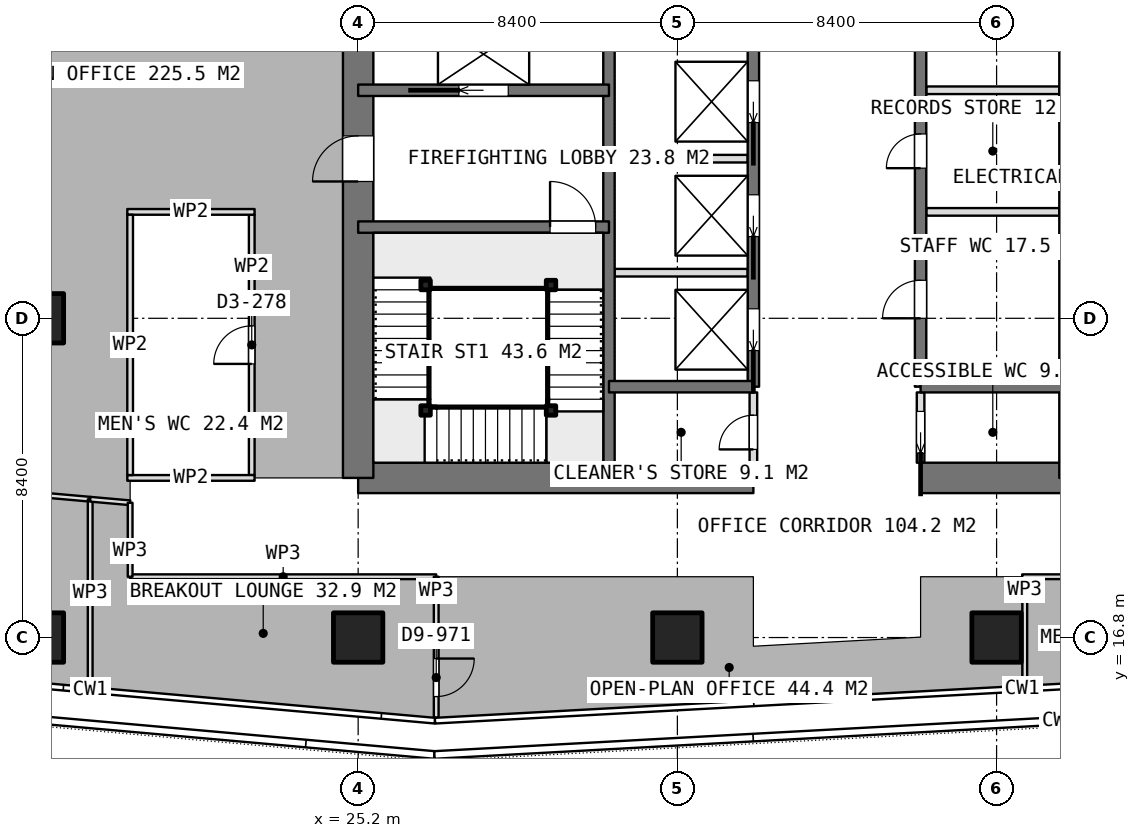
"""IFC4 building model, lengths in metres.
Left out: names, types, materials, properties, quantities, classifications, styles, units other than length and angle.
Written with IfcOpenShell. Run it as: python <this file> out.ifc"""

import sys

from ifc_helpers import new_model, si_unit, direction, frame, frame_2d, origin, origin_2d, place, context, subcontext, project, spatial, rectangle, extrude, element, fill, save


model = new_model("IFC4")
c1 = context("Model", 3, precision=1e-05, world=origin(), true_north=direction((0.0, 1.0)))
c2 = subcontext(c1, "Body", "Model", "MODEL_VIEW")
j1 = project(units=[si_unit("LENGTHUNIT", "METRE"), si_unit("PLANEANGLEUNIT", "RADIAN")], contexts=[c1])
p1 = place(None, origin())
s1 = spatial("IfcSite", under=j1, at=p1, CompositionType="ELEMENT")
p2 = place(p1, origin())
s2 = spatial("IfcBuilding", under=s1, at=p2, CompositionType="ELEMENT")
p3 = place(p2, frame((0.0, 0.0, 261.35)))
s3 = spatial("IfcBuildingStorey", under=s2, at=p3, CompositionType="ELEMENT", Elevation=261.35)
p4 = place(p3, frame((25.2, 21.0, 0.0), z_axis=(0.0, 0.0, 1.0), x_axis=(1.0, 0.0, 0.0)))
e1 = element("IfcWall", 1, at=p4, inside=s3, PredefinedType="SHEAR", context=c2, shape_type="SweptSolid", body=[
    extrude(rectangle(XDim=10.4, YDim=0.8, at=frame_2d((5.2, 0.0))), origin(), (0.0, 0.0, 1.0), 3.75),
])
p5 = place(p3, frame((40.0, 21.0, 0.0), z_axis=(0.0, 0.0, 1.0), x_axis=(1.0, 0.0, 0.0)))
e2 = element("IfcWall", 2, at=p5, inside=s3, PredefinedType="SHEAR", context=c2, shape_type="SweptSolid", body=[
    extrude(rectangle(XDim=10.4, YDim=0.8, at=frame_2d((5.2, 0.0))), origin(), (0.0, 0.0, 1.0), 3.75),
])
p6 = place(p3, frame((25.2, 21.0, 0.0), z_axis=(0.0, 0.0, 1.0), x_axis=(0.0, 1.0, 0.0)))
e3 = element("IfcWall", 3, at=p6, inside=s3, PredefinedType="SHEAR", context=c2, shape_type="SweptSolid", body=[
    extrude(rectangle(XDim=25.2, YDim=0.8, at=frame_2d((12.6, 0.0))), origin(), (0.0, 0.0, 1.0), 3.75),
])
p7 = place(p6, frame((7.8, 0.0, 0.0)))
e4 = element("IfcOpeningElement", 4, at=p7, cuts=e3, PredefinedType="OPENING", context=c2, shape_type="SweptSolid", body=[
    extrude(rectangle(XDim=1.2, YDim=2.1, at=frame_2d((0.6, 1.05))), frame((0.0, 0.41, 0.0), z_axis=(0.0, -1.0, 0.0), x_axis=(1.0, 0.0, 0.0)), (0.0, 0.0, 1.0), 0.82),
])
p8 = place(p6, frame((14.25, 0.0, 0.0)))
e5 = element("IfcOpeningElement", 5, at=p8, cuts=e3, PredefinedType="OPENING", context=c2, shape_type="SweptSolid", body=[
    extrude(rectangle(XDim=0.9, YDim=2.1, at=frame_2d((0.45, 1.05))), frame((0.0, 0.41, 0.0), z_axis=(0.0, -1.0, 0.0), x_axis=(1.0, 0.0, 0.0)), (0.0, 0.0, 1.0), 0.82),
])
p9 = place(p6, frame((16.85, 0.0, 0.0)))
e6 = element("IfcOpeningElement", 6, at=p9, cuts=e3, PredefinedType="OPENING", context=c2, shape_type="SweptSolid", body=[
    extrude(rectangle(XDim=0.9, YDim=2.1, at=frame_2d((0.45, 1.05))), frame((0.0, 0.41, 0.0), z_axis=(0.0, -1.0, 0.0), x_axis=(1.0, 0.0, 0.0)), (0.0, 0.0, 1.0), 0.82),
])
p10 = place(p6, frame((18.95, 0.0, 0.0)))
e7 = element("IfcOpeningElement", 7, at=p10, cuts=e3, PredefinedType="OPENING", context=c2, shape_type="SweptSolid", body=[
    extrude(rectangle(XDim=1.2, YDim=2.1, at=frame_2d((0.6, 1.05))), frame((0.0, 0.41, 0.0), z_axis=(0.0, -1.0, 0.0), x_axis=(1.0, 0.0, 0.0)), (0.0, 0.0, 1.0), 0.82),
])
for number, where, z_axis, x_axis in (
    (8, (31.8, 21.0, 0.0), (0.0, 0.0, 1.0), (0.0, 1.0, 0.0)),
    (9, (43.8, 21.0, 0.0), (0.0, 0.0, 1.0), (0.0, 1.0, 0.0)),
):
    element("IfcWall", number, at=place(p3, frame(where, z_axis=z_axis, x_axis=x_axis)), inside=s3, PredefinedType="SHEAR", context=c2, shape_type="SweptSolid", body=[
        extrude(rectangle(XDim=25.2, YDim=0.3, at=frame_2d((12.6, 0.0))), origin(), (0.0, 0.0, 1.0), 3.75),
    ])
p11 = place(p3, frame((35.6, 23.4, 0.0), z_axis=(0.0, 0.0, 1.0), x_axis=(0.0, 1.0, 0.0)))
e10 = element("IfcWall", 10, at=p11, inside=s3, PredefinedType="SHEAR", context=c2, shape_type="SweptSolid", body=[
    extrude(rectangle(XDim=18.0, YDim=0.3, at=frame_2d((9.0, 0.0))), origin(), (0.0, 0.0, 1.0), 3.75),
])
p12 = place(p11, frame((0.95, 0.0, 0.0)))
e11 = element("IfcOpeningElement", 11, at=p12, cuts=e10, PredefinedType="OPENING", context=c2, shape_type="SweptSolid", body=[
    extrude(rectangle(XDim=1.1, YDim=2.1, at=frame_2d((0.55, 1.05))), frame((0.0, 0.16, 0.0), z_axis=(0.0, -1.0, 0.0), x_axis=(1.0, 0.0, 0.0)), (0.0, 0.0, 1.0), 0.32),
])
p13 = place(p11, frame((3.95, 0.0, 0.0)))
e12 = element("IfcOpeningElement", 12, at=p13, cuts=e10, PredefinedType="OPENING", context=c2, shape_type="SweptSolid", body=[
    extrude(rectangle(XDim=1.1, YDim=2.1, at=frame_2d((0.55, 1.05))), frame((0.0, 0.16, 0.0), z_axis=(0.0, -1.0, 0.0), x_axis=(1.0, 0.0, 0.0)), (0.0, 0.0, 1.0), 0.32),
])
p14 = place(p11, frame((6.95, 0.0, 0.0)))
e13 = element("IfcOpeningElement", 13, at=p14, cuts=e10, PredefinedType="OPENING", context=c2, shape_type="SweptSolid", body=[
    extrude(rectangle(XDim=1.1, YDim=2.1, at=frame_2d((0.55, 1.05))), frame((0.0, 0.16, 0.0), z_axis=(0.0, -1.0, 0.0), x_axis=(1.0, 0.0, 0.0)), (0.0, 0.0, 1.0), 0.32),
])
p15 = place(p11, frame((9.95, 0.0, 0.0)))
e14 = element("IfcOpeningElement", 14, at=p15, cuts=e10, PredefinedType="OPENING", context=c2, shape_type="SweptSolid", body=[
    extrude(rectangle(XDim=1.1, YDim=2.1, at=frame_2d((0.55, 1.05))), frame((0.0, 0.16, 0.0), z_axis=(0.0, -1.0, 0.0), x_axis=(1.0, 0.0, 0.0)), (0.0, 0.0, 1.0), 0.32),
])
p16 = place(p11, frame((12.95, 0.0, 0.0)))
e15 = element("IfcOpeningElement", 15, at=p16, cuts=e10, PredefinedType="OPENING", context=c2, shape_type="SweptSolid", body=[
    extrude(rectangle(XDim=1.1, YDim=2.1, at=frame_2d((0.55, 1.05))), frame((0.0, 0.16, 0.0), z_axis=(0.0, -1.0, 0.0), x_axis=(1.0, 0.0, 0.0)), (0.0, 0.0, 1.0), 0.32),
])
p17 = place(p11, frame((15.95, 0.0, 0.0)))
e16 = element("IfcOpeningElement", 16, at=p17, cuts=e10, PredefinedType="OPENING", context=c2, shape_type="SweptSolid", body=[
    extrude(rectangle(XDim=1.1, YDim=2.1, at=frame_2d((0.55, 1.05))), frame((0.0, 0.16, 0.0), z_axis=(0.0, -1.0, 0.0), x_axis=(1.0, 0.0, 0.0)), (0.0, 0.0, 1.0), 0.32),
])
p18 = place(p3, frame((40.0, 23.4, 0.0), z_axis=(0.0, 0.0, 1.0), x_axis=(0.0, 1.0, 0.0)))
e17 = element("IfcWall", 17, at=p18, inside=s3, PredefinedType="SHEAR", context=c2, shape_type="SweptSolid", body=[
    extrude(rectangle(XDim=18.0, YDim=0.3, at=frame_2d((9.0, 0.0))), origin(), (0.0, 0.0, 1.0), 3.75),
])
p19 = place(p18, frame((1.8, 0.0, 0.0)))
e18 = element("IfcOpeningElement", 18, at=p19, cuts=e17, PredefinedType="OPENING", context=c2, shape_type="SweptSolid", body=[
    extrude(rectangle(XDim=1.0, YDim=2.1, at=frame_2d((0.5, 1.05))), frame((0.0, 0.16, 0.0), z_axis=(0.0, -1.0, 0.0), x_axis=(1.0, 0.0, 0.0)), (0.0, 0.0, 1.0), 0.32),
])
p20 = place(p18, frame((5.75, 0.0, 0.0)))
e19 = element("IfcOpeningElement", 19, at=p20, cuts=e17, PredefinedType="OPENING", context=c2, shape_type="SweptSolid", body=[
    extrude(rectangle(XDim=0.9, YDim=2.1, at=frame_2d((0.45, 1.05))), frame((0.0, 0.16, 0.0), z_axis=(0.0, -1.0, 0.0), x_axis=(1.0, 0.0, 0.0)), (0.0, 0.0, 1.0), 0.32),
])
p21 = place(p18, frame((9.4, 0.0, 0.0)))
e20 = element("IfcOpeningElement", 20, at=p21, cuts=e17, PredefinedType="OPENING", context=c2, shape_type="SweptSolid", body=[
    extrude(rectangle(XDim=1.0, YDim=2.1, at=frame_2d((0.5, 1.05))), frame((0.0, 0.16, 0.0), z_axis=(0.0, -1.0, 0.0), x_axis=(1.0, 0.0, 0.0)), (0.0, 0.0, 1.0), 0.32),
])
for number, where, z_axis, x_axis in (
    (21, (31.8, 23.4, 0.0), (0.0, 0.0, 1.0), (1.0, 0.0, 0.0)),
    (22, (40.0, 23.4, 0.0), (0.0, 0.0, 1.0), (1.0, 0.0, 0.0)),
):
    element("IfcWall", number, at=place(p3, frame(where, z_axis=z_axis, x_axis=x_axis)), inside=s3, PredefinedType="SHEAR", context=c2, shape_type="SweptSolid", body=[
        extrude(rectangle(XDim=3.8, YDim=0.3, at=frame_2d((1.9, 0.0))), origin(), (0.0, 0.0, 1.0), 3.75),
    ])
p22 = place(p3, frame((25.2, 27.6, 0.0), z_axis=(0.0, 0.0, 1.0), x_axis=(1.0, 0.0, 0.0)))
e23 = element("IfcWall", 23, at=p22, inside=s3, PredefinedType="SHEAR", context=c2, shape_type="SweptSolid", body=[
    extrude(rectangle(XDim=6.6, YDim=0.3, at=frame_2d((3.3, 0.0))), origin(), (0.0, 0.0, 1.0), 3.75),
])
p23 = place(p22, frame((5.05, 0.0, 0.0)))
e24 = element("IfcOpeningElement", 24, at=p23, cuts=e23, PredefinedType="OPENING", context=c2, shape_type="SweptSolid", body=[
    extrude(rectangle(XDim=1.2, YDim=2.1, at=frame_2d((0.6, 1.05))), frame((0.0, 0.16, 0.0), z_axis=(0.0, -1.0, 0.0), x_axis=(1.0, 0.0, 0.0)), (0.0, 0.0, 1.0), 0.32),
])
p24 = place(p3, frame((25.2, 31.2, 0.0), z_axis=(0.0, 0.0, 1.0), x_axis=(1.0, 0.0, 0.0)))
e25 = element("IfcWall", 25, at=p24, inside=s3, PredefinedType="SHEAR", context=c2, shape_type="SweptSolid", body=[
    extrude(rectangle(XDim=6.6, YDim=0.3, at=frame_2d((3.3, 0.0))), origin(), (0.0, 0.0, 1.0), 3.75),
])
p25 = place(p24, frame((2.65, 0.0, 0.0)))
e26 = element("IfcOpeningElement", 26, at=p25, cuts=e25, PredefinedType="OPENING", context=c2, shape_type="SweptSolid", body=[
    extrude(rectangle(XDim=1.3, YDim=2.1, at=frame_2d((0.65, 1.05))), frame((0.0, 0.16, 0.0), z_axis=(0.0, -1.0, 0.0), x_axis=(1.0, 0.0, 0.0)), (0.0, 0.0, 1.0), 0.32),
])
for number, where, z_axis, x_axis in (
    (27, (16.8, 16.8, 0.0), (0.0, 0.0, 1.0), (1.0, 0.0, 0.0)),
    (28, (16.8, 25.2, 0.0), (0.0, 0.0, 1.0), (1.0, 0.0, 0.0)),
    (29, (25.2, 16.8, 0.0), (0.0, 0.0, 1.0), (1.0, 0.0, 0.0)),
    (30, (33.6, 16.8, 0.0), (0.0, 0.0, 1.0), (1.0, 0.0, 0.0)),
    (31, (42.0, 16.8, 0.0), (0.0, 0.0, 1.0), (1.0, 0.0, 0.0)),
):
    element("IfcColumn", number, at=place(p3, frame(where, z_axis=z_axis, x_axis=x_axis)), inside=s3, PredefinedType="COLUMN", context=c2, shape_type="SweptSolid", body=[
        extrude(rectangle(XDim=1.3, YDim=1.3, at=origin_2d()), origin(), (0.0, 0.0, 1.0), 3.75),
    ])
for number, where, z_axis, x_axis in (
    (32, (31.95, 26.4, 0.0), (0.0, 0.0, 1.0), (1.0, 0.0, 0.0)),
    (33, (31.95, 29.4, 0.0), (0.0, 0.0, 1.0), (1.0, 0.0, 0.0)),
):
    element("IfcWall", number, at=place(p3, frame(where, z_axis=z_axis, x_axis=x_axis)), inside=s3, PredefinedType="PARTITIONING", context=c2, shape_type="SweptSolid", body=[
        extrude(rectangle(XDim=3.5, YDim=0.2, at=frame_2d((1.75, 0.0))), origin(), (0.0, 0.0, 1.0), 3.5),
    ])
p26 = place(p3, frame((40.0, 21.4, 0.0), z_axis=(0.0, 0.0, 1.0), x_axis=(0.0, 1.0, 0.0)))
e34 = element("IfcWall", 34, at=p26, inside=s3, PredefinedType="PARTITIONING", context=c2, shape_type="SweptSolid", body=[
    extrude(rectangle(XDim=1.85, YDim=0.2, at=frame_2d((0.925, 0.0))), origin(), (0.0, 0.0, 1.0), 3.5),
])
p27 = place(p26, frame((0.25, 0.0, 0.0)))
e35 = element("IfcOpeningElement", 35, at=p27, cuts=e34, PredefinedType="OPENING", context=c2, shape_type="SweptSolid", body=[
    extrude(rectangle(XDim=1.1, YDim=2.1, at=frame_2d((0.55, 1.05))), frame((0.0, 0.11, 0.0), z_axis=(0.0, -1.0, 0.0), x_axis=(1.0, 0.0, 0.0)), (0.0, 0.0, 1.0), 0.22),
])
p28 = place(p3, frame((35.6, 21.4, 0.0), z_axis=(0.0, 0.0, 1.0), x_axis=(0.0, 1.0, 0.0)))
e36 = element("IfcWall", 36, at=p28, inside=s3, PredefinedType="PARTITIONING", context=c2, shape_type="SweptSolid", body=[
    extrude(rectangle(XDim=1.85, YDim=0.2, at=frame_2d((0.925, 0.0))), origin(), (0.0, 0.0, 1.0), 3.5),
])
p29 = place(p28, frame((0.35, 0.0, 0.0)))
e37 = element("IfcOpeningElement", 37, at=p29, cuts=e36, PredefinedType="OPENING", context=c2, shape_type="SweptSolid", body=[
    extrude(rectangle(XDim=0.9, YDim=2.1, at=frame_2d((0.45, 1.05))), frame((0.0, 0.11, 0.0), z_axis=(0.0, -1.0, 0.0), x_axis=(1.0, 0.0, 0.0)), (0.0, 0.0, 1.0), 0.22),
])
for number, where, z_axis, x_axis in (
    (38, (40.15, 28.0, 0.0), (0.0, 0.0, 1.0), (1.0, 0.0, 0.0)),
    (39, (40.15, 31.2, 0.0), (0.0, 0.0, 1.0), (1.0, 0.0, 0.0)),
):
    element("IfcWall", number, at=place(p3, frame(where, z_axis=z_axis, x_axis=x_axis)), inside=s3, PredefinedType="PARTITIONING", context=c2, shape_type="SweptSolid", body=[
        extrude(rectangle(XDim=3.5, YDim=0.2, at=frame_2d((1.75, 0.0))), origin(), (0.0, 0.0, 1.0), 3.5),
    ])
for number, where, z_axis, x_axis in (
    (40, (19.125, 21.0, 0.0), (0.0, 0.0, 1.0), (1.0, 0.0, 0.0)),
    (41, (19.125, 28.0, 0.0), (0.0, 0.0, 1.0), (1.0, 0.0, 0.0)),
):
    element("IfcWall", number, at=place(p3, frame(where, z_axis=z_axis, x_axis=x_axis)), inside=s3, PredefinedType="PARTITIONING", context=c2, shape_type="SweptSolid", body=[
        extrude(rectangle(XDim=3.35, YDim=0.15, at=frame_2d((1.675, 0.0))), origin(), (0.0, 0.0, 1.0), 3.5),
    ])
p30 = place(p3, frame((19.2, 21.075, 0.0), z_axis=(0.0, 0.0, 1.0), x_axis=(0.0, 1.0, 0.0)))
e42 = element("IfcWall", 42, at=p30, inside=s3, PredefinedType="PARTITIONING", context=c2, shape_type="SweptSolid", body=[
    extrude(rectangle(XDim=6.85, YDim=0.15, at=frame_2d((3.425, 0.0))), origin(), (0.0, 0.0, 1.0), 3.5),
])
p31 = place(p3, frame((22.4, 21.075, 0.0), z_axis=(0.0, 0.0, 1.0), x_axis=(0.0, 1.0, 0.0)))
e43 = element("IfcWall", 43, at=p31, inside=s3, PredefinedType="PARTITIONING", context=c2, shape_type="SweptSolid", body=[
    extrude(rectangle(XDim=6.85, YDim=0.15, at=frame_2d((3.425, 0.0))), origin(), (0.0, 0.0, 1.0), 3.5),
])
p32 = place(p31, frame((2.925, 0.0, 0.0)))
e44 = element("IfcOpeningElement", 44, at=p32, cuts=e43, PredefinedType="OPENING", context=c2, shape_type="SweptSolid", body=[
    extrude(rectangle(XDim=1.0, YDim=2.1, at=frame_2d((0.5, 1.05))), frame((0.0, 0.085, 0.0), z_axis=(0.0, -1.0, 0.0), x_axis=(1.0, 0.0, 0.0)), (0.0, 0.0, 1.0), 0.17),
])
p33 = place(p3, frame((42.742, 15.538, 0.0), z_axis=(0.0, 0.0, 1.0), x_axis=(0.0, 1.0, 0.0)))
e45 = element("IfcWall", 45, at=p33, inside=s3, PredefinedType="PARTITIONING", context=c2, shape_type="SweptSolid", body=[
    extrude(rectangle(XDim=2.799, YDim=0.125, at=frame_2d((1.399, 0.0))), origin(), (0.0, 0.0, 1.0), 3.5),
])
p34 = place(p3, frame((42.674, 18.4, 0.0), z_axis=(0.0, 0.0, 1.0), x_axis=(1.0, 0.0, 0.0)))
e46 = element("IfcWall", 46, at=p34, inside=s3, PredefinedType="PARTITIONING", context=c2, shape_type="SweptSolid", body=[
    extrude(rectangle(XDim=7.726, YDim=0.125, at=frame_2d((3.863, 0.0))), origin(), (0.0, 0.0, 1.0), 3.5),
])
p35 = place(p34, frame((3.363, 0.0, 0.0)))
e47 = element("IfcOpeningElement", 47, at=p35, cuts=e46, PredefinedType="OPENING", context=c2, shape_type="SweptSolid", body=[
    extrude(rectangle(XDim=1.0, YDim=2.1, at=frame_2d((0.5, 1.05))), frame((0.0, 0.073, 0.0), z_axis=(0.0, -1.0, 0.0), x_axis=(1.0, 0.0, 0.0)), (0.0, 0.0, 1.0), 0.145),
])
p36 = place(p3, frame((12.261, 20.962, 0.0), z_axis=(0.0, 0.0, 1.0), x_axis=(0.996078951833, -0.08846876124, 0.0)))
e48 = element("IfcWall", 48, at=p36, inside=s3, PredefinedType="PARTITIONING", context=c2, shape_type="SweptSolid", body=[
    extrude(rectangle(XDim=5.911, YDim=0.125, at=frame_2d((2.956, 0.0))), origin(), (0.0, 0.0, 1.0), 3.5),
])
p37 = place(p3, frame((18.149, 20.439, 0.0), z_axis=(0.0, 0.0, 1.0), x_axis=(0.0, -1.0, 0.0)))
e49 = element("IfcWall", 49, at=p37, inside=s3, PredefinedType="PARTITIONING", context=c2, shape_type="SweptSolid", body=[
    extrude(rectangle(XDim=4.939, YDim=0.125, at=frame_2d((2.469, 0.0))), origin(), (0.0, 0.0, 1.0), 3.5),
])
p38 = place(p3, frame((19.2, 18.4, 0.0), z_axis=(0.0, 0.0, 1.0), x_axis=(1.0, 0.0, 0.0)))
e50 = element("IfcWall", 50, at=p38, inside=s3, PredefinedType="PARTITIONING", context=c2, shape_type="SweptSolid", body=[
    extrude(rectangle(XDim=8.054, YDim=0.125, at=frame_2d((4.027, 0.0))), origin(), (0.0, 0.0, 1.0), 3.5),
])
p39 = place(p3, frame((27.254, 18.4, 0.0), z_axis=(0.0, 0.0, 1.0), x_axis=(0.0, -1.0, 0.0)))
e51 = element("IfcWall", 51, at=p39, inside=s3, PredefinedType="PARTITIONING", context=c2, shape_type="SweptSolid", body=[
    extrude(rectangle(XDim=3.705, YDim=0.125, at=frame_2d((1.853, 0.0))), origin(), (0.0, 0.0, 1.0), 3.5),
])
p40 = place(p39, frame((2.153, 0.0, 0.0)))
e52 = element("IfcOpeningElement", 52, at=p40, cuts=e51, PredefinedType="OPENING", context=c2, shape_type="SweptSolid", body=[
    extrude(rectangle(XDim=1.0, YDim=2.1, at=frame_2d((0.5, 1.05))), frame((0.0, 0.073, 0.0), z_axis=(0.0, -1.0, 0.0), x_axis=(1.0, 0.0, 0.0)), (0.0, 0.0, 1.0), 0.145),
])
p41 = place(p3, frame((18.15, 20.439, 0.0), z_axis=(0.0, 0.0, 1.0), x_axis=(0.996099374617, -0.088238517026, 0.0)))
e53 = element("IfcWall", 53, at=p41, inside=s3, PredefinedType="PARTITIONING", context=c2, shape_type="SweptSolid", body=[
    extrude(rectangle(XDim=1.054, YDim=0.125, at=frame_2d((0.527, 0.0))), origin(), (0.0, 0.0, 1.0), 3.5),
])
p42 = place(p3, frame((19.2, 20.346, 0.0), z_axis=(0.0, 0.0, 1.0), x_axis=(0.0, -1.0, 0.0)))
e54 = element("IfcWall", 54, at=p42, inside=s3, PredefinedType="PARTITIONING", context=c2, shape_type="SweptSolid", body=[
    extrude(rectangle(XDim=1.946, YDim=0.125, at=frame_2d((0.973, 0.0))), origin(), (0.0, 0.0, 1.0), 3.5),
])
for number, where, z_axis, x_axis in (
    (55, (30.275, 26.075, 0.0), (0.0, 0.0, 1.0), (1.0, 0.0, 0.0)),
    (56, (30.275, 22.775, 0.0), (0.0, 0.0, 1.0), (1.0, 0.0, 0.0)),
    (57, (26.975, 22.775, 0.0), (0.0, 0.0, 1.0), (1.0, 0.0, 0.0)),
    (58, (26.975, 26.075, 0.0), (0.0, 0.0, 1.0), (1.0, 0.0, 0.0)),
):
    element("IfcColumn", number, at=place(p3, frame(where, z_axis=z_axis, x_axis=x_axis)), inside=s3, PredefinedType="COLUMN", context=c2, shape_type="SweptSolid", body=[
        extrude(rectangle(XDim=0.25, YDim=0.25, at=origin_2d()), origin(), (0.0, 0.0, 1.0), 3.75),
    ])
p43 = place(p7, origin())
e59 = element("IfcDoor", 59, at=p43, inside=s3, OperationType="SINGLE_SWING_LEFT", PredefinedType="DOOR", context=c2, shape_type="SweptSolid", body=[
    extrude(rectangle(XDim=1.2, YDim=2.1, at=frame_2d((0.6, 1.05))), frame((0.0, 0.025, 0.0), z_axis=(0.0, -1.0, 0.0), x_axis=(1.0, 0.0, 0.0)), (0.0, 0.0, 1.0), 0.05),
])
fill(e4, e59)
p44 = place(p27, origin())
e60 = element("IfcDoor", 60, at=p44, inside=s3, OperationType="SLIDING_TO_LEFT", PredefinedType="DOOR", context=c2, shape_type="SweptSolid", body=[
    extrude(rectangle(XDim=1.1, YDim=2.1, at=frame_2d((0.55, 1.05))), frame((0.0, 0.025, 0.0), z_axis=(0.0, -1.0, 0.0), x_axis=(1.0, 0.0, 0.0)), (0.0, 0.0, 1.0), 0.05),
])
fill(e35, e60)
p45 = place(p29, origin())
e61 = element("IfcDoor", 61, at=p45, inside=s3, OperationType="SINGLE_SWING_LEFT", PredefinedType="DOOR", context=c2, shape_type="SweptSolid", body=[
    extrude(rectangle(XDim=0.9, YDim=2.1, at=frame_2d((0.45, 1.05))), frame((0.0, 0.025, 0.0), z_axis=(0.0, -1.0, 0.0), x_axis=(1.0, 0.0, 0.0)), (0.0, 0.0, 1.0), 0.05),
])
fill(e37, e61)
p46 = place(p19, origin())
e62 = element("IfcDoor", 62, at=p46, inside=s3, OperationType="SINGLE_SWING_LEFT", PredefinedType="DOOR", context=c2, shape_type="SweptSolid", body=[
    extrude(rectangle(XDim=1.0, YDim=2.1, at=frame_2d((0.5, 1.05))), frame((0.0, 0.025, 0.0), z_axis=(0.0, -1.0, 0.0), x_axis=(1.0, 0.0, 0.0)), (0.0, 0.0, 1.0), 0.05),
])
fill(e18, e62)
p47 = place(p20, origin())
e63 = element("IfcDoor", 63, at=p47, inside=s3, OperationType="SINGLE_SWING_LEFT", PredefinedType="DOOR", context=c2, shape_type="SweptSolid", body=[
    extrude(rectangle(XDim=0.9, YDim=2.1, at=frame_2d((0.45, 1.05))), frame((0.0, 0.025, 0.0), z_axis=(0.0, -1.0, 0.0), x_axis=(1.0, 0.0, 0.0)), (0.0, 0.0, 1.0), 0.05),
])
fill(e19, e63)
p48 = place(p12, origin())
e64 = element("IfcDoor", 64, at=p48, inside=s3, OperationType="SLIDING_TO_LEFT", PredefinedType="USERDEFINED", context=c2, shape_type="SweptSolid", body=[
    extrude(rectangle(XDim=1.1, YDim=2.1, at=frame_2d((0.55, 1.05))), frame((0.0, 0.025, 0.0), z_axis=(0.0, -1.0, 0.0), x_axis=(1.0, 0.0, 0.0)), (0.0, 0.0, 1.0), 0.05),
])
fill(e11, e64)
p49 = place(p13, origin())
e65 = element("IfcDoor", 65, at=p49, inside=s3, OperationType="SLIDING_TO_LEFT", PredefinedType="USERDEFINED", context=c2, shape_type="SweptSolid", body=[
    extrude(rectangle(XDim=1.1, YDim=2.1, at=frame_2d((0.55, 1.05))), frame((0.0, 0.025, 0.0), z_axis=(0.0, -1.0, 0.0), x_axis=(1.0, 0.0, 0.0)), (0.0, 0.0, 1.0), 0.05),
])
fill(e12, e65)
p50 = place(p14, origin())
e66 = element("IfcDoor", 66, at=p50, inside=s3, OperationType="SLIDING_TO_LEFT", PredefinedType="USERDEFINED", context=c2, shape_type="SweptSolid", body=[
    extrude(rectangle(XDim=1.1, YDim=2.1, at=frame_2d((0.55, 1.05))), frame((0.0, 0.025, 0.0), z_axis=(0.0, -1.0, 0.0), x_axis=(1.0, 0.0, 0.0)), (0.0, 0.0, 1.0), 0.05),
])
fill(e13, e66)
p51 = place(p25, origin())
e67 = element("IfcDoor", 67, at=p51, inside=s3, OperationType="SLIDING_TO_LEFT", PredefinedType="USERDEFINED", context=c2, shape_type="SweptSolid", body=[
    extrude(rectangle(XDim=1.3, YDim=2.1, at=frame_2d((0.65, 1.05))), frame((0.0, 0.025, 0.0), z_axis=(0.0, -1.0, 0.0), x_axis=(1.0, 0.0, 0.0)), (0.0, 0.0, 1.0), 0.05),
])
fill(e26, e67)
p52 = place(p32, origin())
e68 = element("IfcDoor", 68, at=p52, inside=s3, OperationType="SINGLE_SWING_LEFT", PredefinedType="DOOR", context=c2, shape_type="SweptSolid", body=[
    extrude(rectangle(XDim=1.0, YDim=2.1, at=frame_2d((0.5, 1.05))), frame((0.0, 0.025, 0.0), z_axis=(0.0, -1.0, 0.0), x_axis=(1.0, 0.0, 0.0)), (0.0, 0.0, 1.0), 0.05),
])
fill(e44, e68)
p53 = place(p40, origin())
e69 = element("IfcDoor", 69, at=p53, inside=s3, OperationType="SINGLE_SWING_LEFT", PredefinedType="DOOR", context=c2, shape_type="SweptSolid", body=[
    extrude(rectangle(XDim=1.0, YDim=2.1, at=frame_2d((0.5, 1.05))), frame((0.0, 0.025, 0.0), z_axis=(0.0, -1.0, 0.0), x_axis=(1.0, 0.0, 0.0)), (0.0, 0.0, 1.0), 0.05),
])
fill(e52, e69)
p54 = place(p23, origin())
e70 = element("IfcDoor", 70, at=p54, inside=s3, OperationType="SINGLE_SWING_RIGHT", PredefinedType="DOOR", context=c2, shape_type="SweptSolid", body=[
    extrude(rectangle(XDim=1.2, YDim=2.1, at=frame_2d((0.6, 1.05))), frame((0.0, 0.025, 0.0), z_axis=(0.0, -1.0, 0.0), x_axis=(1.0, 0.0, 0.0)), (0.0, 0.0, 1.0), 0.05),
])
fill(e24, e70)
save(model, sys.argv[1])
